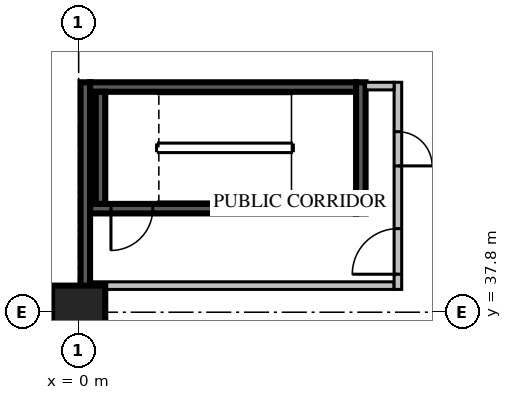
"""IFC4 building model, lengths in metres.
Left out: names, types, materials, properties, quantities, classifications, styles, units other than length and angle.
Written with IfcOpenShell. Run it as: python <this file> out.ifc"""

import sys

from ifc_helpers import new_model, si_unit, direction, frame, frame_2d, origin, origin_2d, place, context, subcontext, project, spatial, rectangle, extrude, source, transform, mapped, element, fill, save


model = new_model("IFC4")
c1 = context("Model", 3, precision=1e-05, world=origin(), true_north=direction((0.0, 1.0)))
c2 = subcontext(c1, "Body", "Model", "MODEL_VIEW")
j1 = project(units=[si_unit("LENGTHUNIT", "METRE"), si_unit("PLANEANGLEUNIT", "RADIAN")], contexts=[c1])
p1 = place(None, origin())
s1 = spatial("IfcSite", under=j1, at=p1, CompositionType="ELEMENT")
p2 = place(p1, origin())
s2 = spatial("IfcBuilding", under=s1, at=p2, CompositionType="ELEMENT")
p3 = place(p2, frame((0.0, 0.0, 29.1)))
s3 = spatial("IfcBuildingStorey", under=s2, at=p3, CompositionType="ELEMENT", Elevation=29.1)
m1 = source(origin(), c2, "Body", "SweptSolid", [
    extrude(rectangle(XDim=1.4, YDim=1.4, at=origin_2d()), origin(), (0.0, 0.0, 1.0), 5.4),
])
p4 = place(p3, frame((0.0, 37.8, 0.0), z_axis=(0.0, 0.0, 1.0), x_axis=(1.0, 0.0, 0.0)))
e1 = element("IfcColumn", 1, at=p4, inside=s3, PredefinedType="COLUMN", context=c2, shape_type="MappedRepresentation", body=[
    mapped(m1, transform((0.0, 0.0, 0.0), scale=1.0)),
])
m2 = source(origin(), c2, "Body", "SweptSolid", [
    extrude(rectangle(XDim=7.0, YDim=0.25, at=frame_2d((3.5, 0.0))), origin(), (0.0, 0.0, 1.0), 4.8),
])
p5 = place(p3, frame((0.3, 40.525, 0.0), z_axis=(0.0, 0.0, 1.0), x_axis=(1.0, 0.0, 0.0)))
e2 = element("IfcWall", 2, at=p5, inside=s3, PredefinedType="SOLIDWALL", context=c2, shape_type="MappedRepresentation", body=[
    mapped(m2, transform((0.0, 0.0, 0.0), scale=1.0)),
])
m3 = source(origin(), c2, "Body", "SweptSolid", [
    extrude(rectangle(XDim=1.1, YDim=2.1, at=frame_2d((0.55, 1.05))), frame((0.0, 0.135, 0.0), z_axis=(0.0, -1.0, 0.0), x_axis=(1.0, 0.0, 0.0)), (0.0, 0.0, 1.0), 0.27),
])
p6 = place(p5, frame((0.55, 0.0, 0.0)))
e3 = element("IfcOpeningElement", 3, at=p6, cuts=e2, PredefinedType="OPENING", context=c2, shape_type="MappedRepresentation", body=[
    mapped(m3, transform((0.0, 0.0, 0.0), scale=1.0)),
])
p7 = place(p3, frame((0.3, 43.725, 0.0), z_axis=(0.0, 0.0, 1.0), x_axis=(1.0, 0.0, 0.0)))
e4 = element("IfcWall", 4, at=p7, inside=s3, PredefinedType="SOLIDWALL", context=c2, shape_type="MappedRepresentation", body=[
    mapped(m2, transform((0.0, 0.0, 0.0), scale=1.0)),
])
m4 = source(origin(), c2, "Body", "SweptSolid", [
    extrude(rectangle(XDim=3.45, YDim=0.25, at=frame_2d((1.725, 0.0))), origin(), (0.0, 0.0, 1.0), 4.8),
])
p8 = place(p3, frame((7.425, 40.4, 0.0), z_axis=(0.0, 0.0, 1.0), x_axis=(0.0, 1.0, 0.0)))
e5 = element("IfcWall", 5, at=p8, inside=s3, PredefinedType="SOLIDWALL", context=c2, shape_type="MappedRepresentation", body=[
    mapped(m4, transform((0.0, 0.0, 0.0), scale=1.0)),
])
m5 = source(origin(), c2, "Body", "SweptSolid", [
    extrude(rectangle(XDim=2.95, YDim=0.25, at=frame_2d((1.475, 0.0))), origin(), (0.0, 0.0, 1.0), 4.8),
])
p9 = place(p3, frame((0.575, 40.65, 0.0), z_axis=(0.0, 0.0, 1.0), x_axis=(0.0, 1.0, 0.0)))
e6 = element("IfcWall", 6, at=p9, inside=s3, PredefinedType="SOLIDWALL", context=c2, shape_type="MappedRepresentation", body=[
    mapped(m5, transform((0.0, 0.0, 0.0), scale=1.0)),
])
m6 = source(origin(), c2, "Body", "SweptSolid", [
    extrude(rectangle(XDim=8.0, YDim=0.2, at=frame_2d((4.0, 0.0))), origin(), (0.0, 0.0, 1.0), 4.8),
])
p10 = place(p3, frame((0.3, 38.5, 0.0), z_axis=(0.0, 0.0, 1.0), x_axis=(1.0, 0.0, 0.0)))
e7 = element("IfcWall", 7, at=p10, inside=s3, PredefinedType="PARTITIONING", context=c2, shape_type="MappedRepresentation", body=[
    mapped(m6, transform((0.0, 0.0, 0.0), scale=1.0)),
])
m7 = source(origin(), c2, "Body", "SweptSolid", [
    extrude(rectangle(XDim=5.45, YDim=0.2, at=frame_2d((2.725, 0.0))), origin(), (0.0, 0.0, 1.0), 4.8),
])
p11 = place(p3, frame((8.4, 38.4, 0.0), z_axis=(0.0, 0.0, 1.0), x_axis=(0.0, 1.0, 0.0)))
e8 = element("IfcWall", 8, at=p11, inside=s3, PredefinedType="PARTITIONING", context=c2, shape_type="MappedRepresentation", body=[
    mapped(m7, transform((0.0, 0.0, 0.0), scale=1.0)),
])
m8 = source(origin(), c2, "Body", "SweptSolid", [
    extrude(rectangle(XDim=1.2, YDim=2.1, at=frame_2d((0.6, 1.05))), frame((0.0, 0.11, 0.0), z_axis=(0.0, -1.0, 0.0), x_axis=(1.0, 0.0, 0.0)), (0.0, 0.0, 1.0), 0.22),
])
p12 = place(p11, frame((0.4, 0.0, 0.0)))
e9 = element("IfcOpeningElement", 9, at=p12, cuts=e8, PredefinedType="OPENING", context=c2, shape_type="MappedRepresentation", body=[
    mapped(m8, transform((0.0, 0.0, 0.0), scale=1.0)),
])
m9 = source(origin(), c2, "Body", "SweptSolid", [
    extrude(rectangle(XDim=0.9, YDim=2.1, at=frame_2d((0.45, 1.05))), frame((0.0, 0.11, 0.0), z_axis=(0.0, -1.0, 0.0), x_axis=(1.0, 0.0, 0.0)), (0.0, 0.0, 1.0), 0.22),
])
p13 = place(p11, frame((3.25, 0.0, 0.0)))
e10 = element("IfcOpeningElement", 10, at=p13, cuts=e8, PredefinedType="OPENING", context=c2, shape_type="MappedRepresentation", body=[
    mapped(m9, transform((0.0, 0.0, 0.0), scale=1.0)),
])
m10 = source(origin(), c2, "Body", "SweptSolid", [
    extrude(rectangle(XDim=0.75, YDim=0.2, at=frame_2d((0.375, 0.0))), origin(), (0.0, 0.0, 1.0), 4.8),
])
p14 = place(p3, frame((7.55, 43.75, 0.0), z_axis=(0.0, 0.0, 1.0), x_axis=(1.0, 0.0, 0.0)))
e11 = element("IfcWall", 11, at=p14, inside=s3, PredefinedType="PARTITIONING", context=c2, shape_type="MappedRepresentation", body=[
    mapped(m10, transform((0.0, 0.0, 0.0), scale=1.0)),
])
m11 = source(origin(), c2, "Body", "SweptSolid", [
    extrude(rectangle(XDim=5.45, YDim=0.25, at=frame_2d((2.725, 0.0))), origin(), (0.0, 0.0, 1.0), 4.8),
])
p15 = place(p3, frame((0.175, 38.4, 0.0), z_axis=(0.0, 0.0, 1.0), x_axis=(0.0, 1.0, 0.0)))
e12 = element("IfcWall", 12, at=p15, inside=s3, PredefinedType="SOLIDWALL", context=c2, shape_type="MappedRepresentation", body=[
    mapped(m11, transform((0.0, 0.0, 0.0), scale=1.0)),
])
m12 = source(origin(), c2, "Body", "SweptSolid", [
    extrude(rectangle(XDim=1.1, YDim=2.1, at=frame_2d((0.55, 1.05))), frame((0.0, 0.025, 0.0), z_axis=(0.0, -1.0, 0.0), x_axis=(1.0, 0.0, 0.0)), (0.0, 0.0, 1.0), 0.05),
])
p16 = place(p6, origin())
e13 = element("IfcDoor", 13, at=p16, inside=s3, OperationType="SINGLE_SWING_RIGHT", PredefinedType="DOOR", context=c2, shape_type="MappedRepresentation", body=[
    mapped(m12, transform((0.0, 0.0, 0.0), scale=1.0)),
])
fill(e3, e13)
m13 = source(origin(), c2, "Body", "SweptSolid", [
    extrude(rectangle(XDim=1.2, YDim=2.1, at=frame_2d((0.6, 1.05))), frame((0.0, 0.025, 0.0), z_axis=(0.0, -1.0, 0.0), x_axis=(1.0, 0.0, 0.0)), (0.0, 0.0, 1.0), 0.05),
])
p17 = place(p12, origin())
e14 = element("IfcDoor", 14, at=p17, inside=s3, OperationType="SINGLE_SWING_LEFT", PredefinedType="DOOR", context=c2, shape_type="MappedRepresentation", body=[
    mapped(m13, transform((0.0, 0.0, 0.0), scale=1.0)),
])
fill(e9, e14)
m14 = source(origin(), c2, "Body", "SweptSolid", [
    extrude(rectangle(XDim=0.9, YDim=2.1, at=frame_2d((0.45, 1.05))), frame((0.0, 0.025, 0.0), z_axis=(0.0, -1.0, 0.0), x_axis=(1.0, 0.0, 0.0)), (0.0, 0.0, 1.0), 0.05),
])
p18 = place(p13, origin())
e15 = element("IfcDoor", 15, at=p18, inside=s3, OperationType="SINGLE_SWING_RIGHT", PredefinedType="DOOR", context=c2, shape_type="MappedRepresentation", body=[
    mapped(m14, transform((0.0, 0.0, 0.0), scale=1.0)),
])
fill(e10, e15)
save(model, sys.argv[1])
